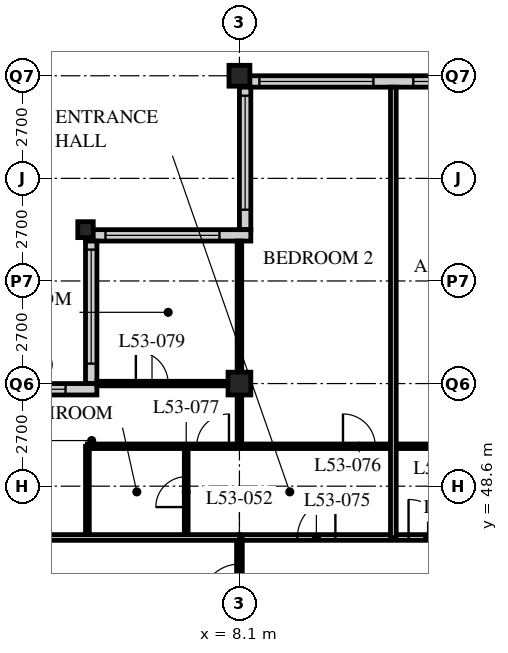
"""IFC4 building model, lengths in metres.
Left out: names, types, materials, properties, quantities, classifications, styles, units other than length and angle.
Written with IfcOpenShell. Run it as: python <this file> out.ifc"""

import sys

from ifc_helpers import new_model, si_unit, direction, frame, frame_2d, origin, origin_2d, place, context, subcontext, project, spatial, rectangle, hollow_rectangle, i_section, extrude, element, fill, save


model = new_model("IFC4")
c1 = context("Model", 3, precision=1e-05, world=origin(), true_north=direction((0.0, 1.0)))
c2 = subcontext(c1, "Body", "Model", "MODEL_VIEW")
j1 = project(units=[si_unit("LENGTHUNIT", "METRE"), si_unit("PLANEANGLEUNIT", "RADIAN")], contexts=[c1])
p1 = place(None, origin())
s1 = spatial("IfcSite", under=j1, at=p1, CompositionType="ELEMENT")
p2 = place(p1, origin())
s2 = spatial("IfcBuilding", under=s1, at=p2, CompositionType="ELEMENT")
p3 = place(p2, frame((0.0, 0.0, 206.4)))
s3 = spatial("IfcBuildingStorey", under=s2, at=p3, CompositionType="ELEMENT", Elevation=206.4)
p4 = place(p3, frame((4.05, 55.35, 0.0), z_axis=(0.0, 0.0, 1.0), x_axis=(1.0, 0.0, 0.0)))
e1 = element("IfcColumn", 1, at=p4, inside=s3, PredefinedType="COLUMN", context=c2, shape_type="SweptSolid", body=[
    extrude(i_section(OverallWidth=0.407, OverallDepth=0.419, WebThickness=0.031, FlangeThickness=0.049, FilletRadius=0.015, at=origin_2d()), origin(), (0.0, 0.0, 1.0), 3.6),
])
p5 = place(p3, frame((8.1, 51.3, 0.0), z_axis=(0.0, 0.0, 1.0), x_axis=(1.0, 0.0, 0.0)))
e2 = element("IfcColumn", 2, at=p5, inside=s3, PredefinedType="COLUMN", context=c2, shape_type="SweptSolid", body=[
    extrude(hollow_rectangle(XDim=0.6, YDim=0.6, WallThickness=0.05, at=origin_2d()), origin(), (0.0, 0.0, 1.0), 3.6),
])
p6 = place(p3, frame((8.1, 59.4, 0.0), z_axis=(0.0, 0.0, 1.0), x_axis=(1.0, 0.0, 0.0)))
e3 = element("IfcColumn", 3, at=p6, inside=s3, PredefinedType="COLUMN", context=c2, shape_type="SweptSolid", body=[
    extrude(hollow_rectangle(XDim=0.55, YDim=0.55, WallThickness=0.045, at=origin_2d()), origin(), (0.0, 0.0, 1.0), 3.6),
])
p7 = place(p3, frame((48.3, 59.25, 0.0), z_axis=(0.0, 0.0, 1.0), x_axis=(-1.0, 0.0, 0.0)))
e4 = element("IfcWall", 4, at=p7, inside=s3, PredefinedType="SOLIDWALL", context=c2, shape_type="SweptSolid", body=[
    extrude(rectangle(XDim=40.2, YDim=0.3, at=frame_2d((20.1, 0.0))), origin(), (0.0, 0.0, 1.0), 3.39),
])
p8 = place(p7, frame((0.225, 0.0, 0.6)))
e5 = element("IfcOpeningElement", 5, at=p8, cuts=e4, PredefinedType="OPENING", context=c2, shape_type="SweptSolid", body=[
    extrude(rectangle(XDim=3.0, YDim=2.4, at=frame_2d((1.5, 1.2))), frame((0.0, 0.16, 0.0), z_axis=(0.0, -1.0, 0.0), x_axis=(1.0, 0.0, 0.0)), (0.0, 0.0, 1.0), 0.32),
])
p9 = place(p7, frame((4.275, 0.0, 0.6)))
e6 = element("IfcOpeningElement", 6, at=p9, cuts=e4, PredefinedType="OPENING", context=c2, shape_type="SweptSolid", body=[
    extrude(rectangle(XDim=3.0, YDim=2.4, at=frame_2d((1.5, 1.2))), frame((0.0, 0.16, 0.0), z_axis=(0.0, -1.0, 0.0), x_axis=(1.0, 0.0, 0.0)), (0.0, 0.0, 1.0), 0.32),
])
p10 = place(p7, frame((8.325, 0.0, 0.6)))
e7 = element("IfcOpeningElement", 7, at=p10, cuts=e4, PredefinedType="OPENING", context=c2, shape_type="SweptSolid", body=[
    extrude(rectangle(XDim=3.0, YDim=2.4, at=frame_2d((1.5, 1.2))), frame((0.0, 0.16, 0.0), z_axis=(0.0, -1.0, 0.0), x_axis=(1.0, 0.0, 0.0)), (0.0, 0.0, 1.0), 0.32),
])
p11 = place(p7, frame((12.375, 0.0, 0.6)))
e8 = element("IfcOpeningElement", 8, at=p11, cuts=e4, PredefinedType="OPENING", context=c2, shape_type="SweptSolid", body=[
    extrude(rectangle(XDim=3.0, YDim=2.4, at=frame_2d((1.5, 1.2))), frame((0.0, 0.16, 0.0), z_axis=(0.0, -1.0, 0.0), x_axis=(1.0, 0.0, 0.0)), (0.0, 0.0, 1.0), 0.32),
])
p12 = place(p7, frame((16.425, 0.0, 0.6)))
e9 = element("IfcOpeningElement", 9, at=p12, cuts=e4, PredefinedType="OPENING", context=c2, shape_type="SweptSolid", body=[
    extrude(rectangle(XDim=3.0, YDim=2.4, at=frame_2d((1.5, 1.2))), frame((0.0, 0.16, 0.0), z_axis=(0.0, -1.0, 0.0), x_axis=(1.0, 0.0, 0.0)), (0.0, 0.0, 1.0), 0.32),
])
p13 = place(p7, frame((20.475, 0.0, 0.6)))
e10 = element("IfcOpeningElement", 10, at=p13, cuts=e4, PredefinedType="OPENING", context=c2, shape_type="SweptSolid", body=[
    extrude(rectangle(XDim=3.0, YDim=2.4, at=frame_2d((1.5, 1.2))), frame((0.0, 0.16, 0.0), z_axis=(0.0, -1.0, 0.0), x_axis=(1.0, 0.0, 0.0)), (0.0, 0.0, 1.0), 0.32),
])
p14 = place(p7, frame((24.525, 0.0, 0.6)))
e11 = element("IfcOpeningElement", 11, at=p14, cuts=e4, PredefinedType="OPENING", context=c2, shape_type="SweptSolid", body=[
    extrude(rectangle(XDim=3.0, YDim=2.4, at=frame_2d((1.5, 1.2))), frame((0.0, 0.16, 0.0), z_axis=(0.0, -1.0, 0.0), x_axis=(1.0, 0.0, 0.0)), (0.0, 0.0, 1.0), 0.32),
])
p15 = place(p7, frame((28.575, 0.0, 0.6)))
e12 = element("IfcOpeningElement", 12, at=p15, cuts=e4, PredefinedType="OPENING", context=c2, shape_type="SweptSolid", body=[
    extrude(rectangle(XDim=3.0, YDim=2.4, at=frame_2d((1.5, 1.2))), frame((0.0, 0.16, 0.0), z_axis=(0.0, -1.0, 0.0), x_axis=(1.0, 0.0, 0.0)), (0.0, 0.0, 1.0), 0.32),
])
p16 = place(p7, frame((32.625, 0.0, 0.6)))
e13 = element("IfcOpeningElement", 13, at=p16, cuts=e4, PredefinedType="OPENING", context=c2, shape_type="SweptSolid", body=[
    extrude(rectangle(XDim=3.0, YDim=2.4, at=frame_2d((1.5, 1.2))), frame((0.0, 0.16, 0.0), z_axis=(0.0, -1.0, 0.0), x_axis=(1.0, 0.0, 0.0)), (0.0, 0.0, 1.0), 0.32),
])
p17 = place(p7, frame((36.675, 0.0, 0.6)))
e14 = element("IfcOpeningElement", 14, at=p17, cuts=e4, PredefinedType="OPENING", context=c2, shape_type="SweptSolid", body=[
    extrude(rectangle(XDim=3.0, YDim=2.4, at=frame_2d((1.5, 1.2))), frame((0.0, 0.16, 0.0), z_axis=(0.0, -1.0, 0.0), x_axis=(1.0, 0.0, 0.0)), (0.0, 0.0, 1.0), 0.32),
])
p18 = place(p3, frame((8.25, 59.1, 0.0), z_axis=(0.0, 0.0, 1.0), x_axis=(0.0, -1.0, 0.0)))
e15 = element("IfcWall", 15, at=p18, inside=s3, PredefinedType="SOLIDWALL", context=c2, shape_type="SweptSolid", body=[
    extrude(rectangle(XDim=3.75, YDim=0.3, at=frame_2d((1.875, 0.0))), origin(), (0.0, 0.0, 1.0), 3.39),
])
p19 = place(p18, frame((0.225, 0.0, 0.6)))
e16 = element("IfcOpeningElement", 16, at=p19, cuts=e15, PredefinedType="OPENING", context=c2, shape_type="SweptSolid", body=[
    extrude(rectangle(XDim=3.0, YDim=2.0, at=frame_2d((1.5, 1.0))), frame((0.0, 0.16, 0.0), z_axis=(0.0, -1.0, 0.0), x_axis=(1.0, 0.0, 0.0)), (0.0, 0.0, 1.0), 0.32),
])
p20 = place(p3, frame((8.4, 55.2, 0.0), z_axis=(0.0, 0.0, 1.0), x_axis=(-1.0, 0.0, 0.0)))
e17 = element("IfcWall", 17, at=p20, inside=s3, PredefinedType="SOLIDWALL", context=c2, shape_type="SweptSolid", body=[
    extrude(rectangle(XDim=4.35, YDim=0.3, at=frame_2d((2.175, 0.0))), origin(), (0.0, 0.0, 1.0), 3.39),
])
p21 = place(p20, frame((0.825, 0.0, 0.6)))
e18 = element("IfcOpeningElement", 18, at=p21, cuts=e17, PredefinedType="OPENING", context=c2, shape_type="SweptSolid", body=[
    extrude(rectangle(XDim=3.0, YDim=2.0, at=frame_2d((1.5, 1.0))), frame((0.0, 0.16, 0.0), z_axis=(0.0, -1.0, 0.0), x_axis=(1.0, 0.0, 0.0)), (0.0, 0.0, 1.0), 0.32),
])
p22 = place(p3, frame((4.2, 55.05, 0.0), z_axis=(0.0, 0.0, 1.0), x_axis=(0.0, -1.0, 0.0)))
e19 = element("IfcWall", 19, at=p22, inside=s3, PredefinedType="SOLIDWALL", context=c2, shape_type="SweptSolid", body=[
    extrude(rectangle(XDim=3.75, YDim=0.3, at=frame_2d((1.875, 0.0))), origin(), (0.0, 0.0, 1.0), 3.39),
])
p23 = place(p22, frame((0.225, 0.0, 0.6)))
e20 = element("IfcOpeningElement", 20, at=p23, cuts=e19, PredefinedType="OPENING", context=c2, shape_type="SweptSolid", body=[
    extrude(rectangle(XDim=3.0, YDim=2.0, at=frame_2d((1.5, 1.0))), frame((0.0, 0.16, 0.0), z_axis=(0.0, -1.0, 0.0), x_axis=(1.0, 0.0, 0.0)), (0.0, 0.0, 1.0), 0.32),
])
p24 = place(p3, frame((4.35, 51.15, 0.0), z_axis=(0.0, 0.0, 1.0), x_axis=(-1.0, 0.0, 0.0)))
e21 = element("IfcWall", 21, at=p24, inside=s3, PredefinedType="SOLIDWALL", context=c2, shape_type="SweptSolid", body=[
    extrude(rectangle(XDim=4.35, YDim=0.3, at=frame_2d((2.175, 0.0))), origin(), (0.0, 0.0, 1.0), 3.39),
])
p25 = place(p24, frame((0.825, 0.0, 0.6)))
e22 = element("IfcOpeningElement", 22, at=p25, cuts=e21, PredefinedType="OPENING", context=c2, shape_type="SweptSolid", body=[
    extrude(rectangle(XDim=3.0, YDim=2.0, at=frame_2d((1.5, 1.0))), frame((0.0, 0.16, 0.0), z_axis=(0.0, -1.0, 0.0), x_axis=(1.0, 0.0, 0.0)), (0.0, 0.0, 1.0), 0.32),
])
p26 = place(p3, frame((8.1, 47.25, 0.0), z_axis=(0.0, 0.0, 1.0), x_axis=(1.0, 0.0, 0.0)))
e23 = element("IfcWall", 23, at=p26, inside=s3, PredefinedType="PARTITIONING", context=c2, shape_type="SweptSolid", body=[
    extrude(rectangle(XDim=36.45, YDim=0.15, at=frame_2d((18.225, 0.0))), origin(), (0.0, 0.0, 1.0), 3.39),
])
p27 = place(p26, frame((4.45, 0.0, 0.0)))
e24 = element("IfcOpeningElement", 24, at=p27, cuts=e23, PredefinedType="OPENING", context=c2, shape_type="SweptSolid", body=[
    extrude(rectangle(XDim=1.0, YDim=2.1, at=frame_2d((0.5, 1.05))), frame((0.0, 0.085, 0.0), z_axis=(0.0, -1.0, 0.0), x_axis=(1.0, 0.0, 0.0)), (0.0, 0.0, 1.0), 0.17),
])
p28 = place(p26, frame((12.55, 0.0, 0.0)))
e25 = element("IfcOpeningElement", 25, at=p28, cuts=e23, PredefinedType="OPENING", context=c2, shape_type="SweptSolid", body=[
    extrude(rectangle(XDim=1.0, YDim=2.1, at=frame_2d((0.5, 1.05))), frame((0.0, 0.085, 0.0), z_axis=(0.0, -1.0, 0.0), x_axis=(1.0, 0.0, 0.0)), (0.0, 0.0, 1.0), 0.17),
])
p29 = place(p26, frame((30.7, 0.0, 0.0)))
e26 = element("IfcOpeningElement", 26, at=p29, cuts=e23, PredefinedType="OPENING", context=c2, shape_type="SweptSolid", body=[
    extrude(rectangle(XDim=1.0, YDim=2.1, at=frame_2d((0.5, 1.05))), frame((0.0, 0.085, 0.0), z_axis=(0.0, -1.0, 0.0), x_axis=(1.0, 0.0, 0.0)), (0.0, 0.0, 1.0), 0.17),
])
p30 = place(p26, frame((33.925, 0.0, 0.0)))
e27 = element("IfcOpeningElement", 27, at=p30, cuts=e23, PredefinedType="OPENING", context=c2, shape_type="SweptSolid", body=[
    extrude(rectangle(XDim=1.0, YDim=2.1, at=frame_2d((0.5, 1.05))), frame((0.0, 0.085, 0.0), z_axis=(0.0, -1.0, 0.0), x_axis=(1.0, 0.0, 0.0)), (0.0, 0.0, 1.0), 0.17),
])
p31 = place(p26, frame((1.525, 0.0, 0.0)))
e28 = element("IfcOpeningElement", 28, at=p31, cuts=e23, PredefinedType="OPENING", context=c2, shape_type="SweptSolid", body=[
    extrude(rectangle(XDim=1.0, YDim=2.1, at=frame_2d((0.5, 1.05))), frame((0.0, 0.085, 0.0), z_axis=(0.0, -1.0, 0.0), x_axis=(1.0, 0.0, 0.0)), (0.0, 0.0, 1.0), 0.17),
])
p32 = place(p3, frame((8.1, 18.9, 0.0), z_axis=(0.0, 0.0, 1.0), x_axis=(0.0, 1.0, 0.0)))
e29 = element("IfcWall", 29, at=p32, inside=s3, PredefinedType="PARTITIONING", context=c2, shape_type="SweptSolid", body=[
    extrude(rectangle(XDim=28.35, YDim=0.15, at=frame_2d((14.175, 0.0))), origin(), (0.0, 0.0, 1.0), 2.778),
])
p33 = place(p32, frame((0.9, 0.0, 0.0)))
e30 = element("IfcOpeningElement", 30, at=p33, cuts=e29, PredefinedType="OPENING", context=c2, shape_type="SweptSolid", body=[
    extrude(rectangle(XDim=1.0, YDim=2.1, at=frame_2d((0.5, 1.05))), frame((0.0, 0.085, 0.0), z_axis=(0.0, -1.0, 0.0), x_axis=(1.0, 0.0, 0.0)), (0.0, 0.0, 1.0), 0.17),
])
p34 = place(p32, frame((17.1, 0.0, 0.0)))
e31 = element("IfcOpeningElement", 31, at=p34, cuts=e29, PredefinedType="OPENING", context=c2, shape_type="SweptSolid", body=[
    extrude(rectangle(XDim=1.0, YDim=2.1, at=frame_2d((0.5, 1.05))), frame((0.0, 0.085, 0.0), z_axis=(0.0, -1.0, 0.0), x_axis=(1.0, 0.0, 0.0)), (0.0, 0.0, 1.0), 0.17),
])
p35 = place(p32, frame((26.65, 0.0, 0.0)))
e32 = element("IfcOpeningElement", 32, at=p35, cuts=e29, PredefinedType="OPENING", context=c2, shape_type="SweptSolid", body=[
    extrude(rectangle(XDim=1.0, YDim=2.1, at=frame_2d((0.5, 1.05))), frame((0.0, 0.085, 0.0), z_axis=(0.0, -1.0, 0.0), x_axis=(1.0, 0.0, 0.0)), (0.0, 0.0, 1.0), 0.17),
])
p36 = place(p3, frame((6.7, 47.25, 0.0), z_axis=(0.0, 0.0, 1.0), x_axis=(0.0, 1.0, 0.0)))
e33 = element("IfcWall", 33, at=p36, inside=s3, PredefinedType="PARTITIONING", context=c2, shape_type="SweptSolid", body=[
    extrude(rectangle(XDim=2.4, YDim=0.1, at=frame_2d((1.2, 0.0))), origin(), (0.0, 0.0, 1.0), 3.39),
])
p37 = place(p36, frame((0.8, 0.0, 0.0)))
e34 = element("IfcOpeningElement", 34, at=p37, cuts=e33, PredefinedType="OPENING", context=c2, shape_type="SweptSolid", body=[
    extrude(rectangle(XDim=0.8, YDim=2.1, at=frame_2d((0.4, 1.05))), frame((0.0, 0.06, 0.0), z_axis=(0.0, -1.0, 0.0), x_axis=(1.0, 0.0, 0.0)), (0.0, 0.0, 1.0), 0.12),
])
p38 = place(p3, frame((4.1, 47.25, 0.0), z_axis=(0.0, 0.0, 1.0), x_axis=(0.0, 1.0, 0.0)))
e35 = element("IfcWall", 35, at=p38, inside=s3, PredefinedType="PARTITIONING", context=c2, shape_type="SweptSolid", body=[
    extrude(rectangle(XDim=2.4, YDim=0.1, at=frame_2d((1.2, 0.0))), origin(), (0.0, 0.0, 1.0), 3.39),
])
p39 = place(p3, frame((4.1, 49.65, 0.0), z_axis=(0.0, 0.0, 1.0), x_axis=(1.0, 0.0, 0.0)))
e36 = element("IfcWall", 36, at=p39, inside=s3, PredefinedType="PARTITIONING", context=c2, shape_type="SweptSolid", body=[
    extrude(rectangle(XDim=32.35, YDim=0.12, at=frame_2d((16.175, 0.0))), origin(), (0.0, 0.0, 1.0), 3.39),
])
p40 = place(p39, frame((9.025, 0.0, 0.0)))
e37 = element("IfcOpeningElement", 37, at=p40, cuts=e36, PredefinedType="OPENING", context=c2, shape_type="SweptSolid", body=[
    extrude(rectangle(XDim=0.85, YDim=2.1, at=frame_2d((0.425, 1.05))), frame((0.0, 0.07, 0.0), z_axis=(0.0, -1.0, 0.0), x_axis=(1.0, 0.0, 0.0)), (0.0, 0.0, 1.0), 0.14),
])
p41 = place(p39, frame((12.425, 0.0, 0.0)))
e38 = element("IfcOpeningElement", 38, at=p41, cuts=e36, PredefinedType="OPENING", context=c2, shape_type="SweptSolid", body=[
    extrude(rectangle(XDim=0.85, YDim=2.1, at=frame_2d((0.425, 1.05))), frame((0.0, 0.07, 0.0), z_axis=(0.0, -1.0, 0.0), x_axis=(1.0, 0.0, 0.0)), (0.0, 0.0, 1.0), 0.14),
])
p42 = place(p39, frame((17.125, 0.0, 0.0)))
e39 = element("IfcOpeningElement", 39, at=p42, cuts=e36, PredefinedType="OPENING", context=c2, shape_type="SweptSolid", body=[
    extrude(rectangle(XDim=0.85, YDim=2.1, at=frame_2d((0.425, 1.05))), frame((0.0, 0.07, 0.0), z_axis=(0.0, -1.0, 0.0), x_axis=(1.0, 0.0, 0.0)), (0.0, 0.0, 1.0), 0.14),
])
p43 = place(p39, frame((24.575, 0.0, 0.0)))
e40 = element("IfcOpeningElement", 40, at=p43, cuts=e36, PredefinedType="OPENING", context=c2, shape_type="SweptSolid", body=[
    extrude(rectangle(XDim=0.85, YDim=2.1, at=frame_2d((0.425, 1.05))), frame((0.0, 0.07, 0.0), z_axis=(0.0, -1.0, 0.0), x_axis=(1.0, 0.0, 0.0)), (0.0, 0.0, 1.0), 0.14),
])
p44 = place(p39, frame((28.625, 0.0, 0.0)))
e41 = element("IfcOpeningElement", 41, at=p44, cuts=e36, PredefinedType="OPENING", context=c2, shape_type="SweptSolid", body=[
    extrude(rectangle(XDim=0.85, YDim=2.1, at=frame_2d((0.425, 1.05))), frame((0.0, 0.07, 0.0), z_axis=(0.0, -1.0, 0.0), x_axis=(1.0, 0.0, 0.0)), (0.0, 0.0, 1.0), 0.14),
])
p45 = place(p39, frame((6.725, 0.0, 0.0)))
e42 = element("IfcOpeningElement", 42, at=p45, cuts=e36, PredefinedType="OPENING", context=c2, shape_type="SweptSolid", body=[
    extrude(rectangle(XDim=0.85, YDim=2.1, at=frame_2d((0.425, 1.05))), frame((0.0, 0.07, 0.0), z_axis=(0.0, -1.0, 0.0), x_axis=(1.0, 0.0, 0.0)), (0.0, 0.0, 1.0), 0.14),
])
p46 = place(p39, frame((2.875, 0.0, 0.0)))
e43 = element("IfcOpeningElement", 43, at=p46, cuts=e36, PredefinedType="OPENING", context=c2, shape_type="SweptSolid", body=[
    extrude(rectangle(XDim=0.85, YDim=2.1, at=frame_2d((0.425, 1.05))), frame((0.0, 0.07, 0.0), z_axis=(0.0, -1.0, 0.0), x_axis=(1.0, 0.0, 0.0)), (0.0, 0.0, 1.0), 0.14),
])
p47 = place(p3, frame((8.1, 49.65, 0.0), z_axis=(0.0, 0.0, 1.0), x_axis=(0.0, 1.0, 0.0)))
e44 = element("IfcWall", 44, at=p47, inside=s3, PredefinedType="PARTITIONING", context=c2, shape_type="SweptSolid", body=[
    extrude(rectangle(XDim=5.4, YDim=0.12, at=frame_2d((2.7, 0.0))), origin(), (0.0, 0.0, 1.0), 2.778),
])
p48 = place(p3, frame((8.1, 51.3, 0.0), z_axis=(0.0, 0.0, 1.0), x_axis=(-1.0, 0.0, 0.0)))
e45 = element("IfcWall", 45, at=p48, inside=s3, PredefinedType="PARTITIONING", context=c2, shape_type="SweptSolid", body=[
    extrude(rectangle(XDim=3.75, YDim=0.12, at=frame_2d((1.875, 0.0))), origin(), (0.0, 0.0, 1.0), 2.778),
])
p49 = place(p48, frame((1.875, 0.0, 0.0)))
e46 = element("IfcOpeningElement", 46, at=p49, cuts=e45, PredefinedType="OPENING", context=c2, shape_type="SweptSolid", body=[
    extrude(rectangle(XDim=0.85, YDim=2.1, at=frame_2d((0.425, 1.05))), frame((0.0, 0.07, 0.0), z_axis=(0.0, -1.0, 0.0), x_axis=(1.0, 0.0, 0.0)), (0.0, 0.0, 1.0), 0.14),
])
p50 = place(p3, frame((0.3, 47.25, 0.0), z_axis=(0.0, 0.0, 1.0), x_axis=(1.0, 0.0, 0.0)))
e47 = element("IfcWall", 47, at=p50, inside=s3, PredefinedType="PARTITIONING", context=c2, shape_type="SweptSolid", body=[
    extrude(rectangle(XDim=7.8, YDim=0.15, at=frame_2d((3.9, 0.0))), origin(), (0.0, 0.0, 1.0), 3.39),
])
p51 = place(p3, frame((12.15, 47.25, 0.0), z_axis=(0.0, 0.0, 1.0), x_axis=(0.0, 1.0, 0.0)))
e48 = element("IfcWall", 48, at=p51, inside=s3, PredefinedType="PARTITIONING", context=c2, shape_type="SweptSolid", body=[
    extrude(rectangle(XDim=11.85, YDim=0.15, at=frame_2d((5.925, 0.0))), origin(), (0.0, 0.0, 1.0), 3.39),
])
p52 = place(p16, origin())
e49 = element("IfcWindow", 49, at=p52, inside=s3, PartitioningType="SINGLE_PANEL", PredefinedType="WINDOW", context=c2, shape_type="SweptSolid", body=[
    extrude(rectangle(XDim=3.0, YDim=2.4, at=frame_2d((1.5, 1.2))), frame((0.0, 0.03, 0.0), z_axis=(0.0, -1.0, 0.0), x_axis=(1.0, 0.0, 0.0)), (0.0, 0.0, 1.0), 0.06),
])
fill(e13, e49)
p53 = place(p17, origin())
e50 = element("IfcWindow", 50, at=p53, inside=s3, PartitioningType="SINGLE_PANEL", PredefinedType="WINDOW", context=c2, shape_type="SweptSolid", body=[
    extrude(rectangle(XDim=3.0, YDim=2.4, at=frame_2d((1.5, 1.2))), frame((0.0, 0.03, 0.0), z_axis=(0.0, -1.0, 0.0), x_axis=(1.0, 0.0, 0.0)), (0.0, 0.0, 1.0), 0.06),
])
fill(e14, e50)
p54 = place(p19, origin())
e51 = element("IfcWindow", 51, at=p54, inside=s3, PartitioningType="SINGLE_PANEL", PredefinedType="WINDOW", context=c2, shape_type="SweptSolid", body=[
    extrude(rectangle(XDim=3.0, YDim=2.0, at=frame_2d((1.5, 1.0))), frame((0.0, 0.03, 0.0), z_axis=(0.0, -1.0, 0.0), x_axis=(1.0, 0.0, 0.0)), (0.0, 0.0, 1.0), 0.06),
])
fill(e16, e51)
p55 = place(p21, origin())
e52 = element("IfcWindow", 52, at=p55, inside=s3, PartitioningType="SINGLE_PANEL", PredefinedType="WINDOW", context=c2, shape_type="SweptSolid", body=[
    extrude(rectangle(XDim=3.0, YDim=2.0, at=frame_2d((1.5, 1.0))), frame((0.0, 0.03, 0.0), z_axis=(0.0, -1.0, 0.0), x_axis=(1.0, 0.0, 0.0)), (0.0, 0.0, 1.0), 0.06),
])
fill(e18, e52)
p56 = place(p23, origin())
e53 = element("IfcWindow", 53, at=p56, inside=s3, PartitioningType="SINGLE_PANEL", PredefinedType="WINDOW", context=c2, shape_type="SweptSolid", body=[
    extrude(rectangle(XDim=3.0, YDim=2.0, at=frame_2d((1.5, 1.0))), frame((0.0, 0.03, 0.0), z_axis=(0.0, -1.0, 0.0), x_axis=(1.0, 0.0, 0.0)), (0.0, 0.0, 1.0), 0.06),
])
fill(e20, e53)
p57 = place(p25, origin())
e54 = element("IfcWindow", 54, at=p57, inside=s3, PartitioningType="SINGLE_PANEL", PredefinedType="WINDOW", context=c2, shape_type="SweptSolid", body=[
    extrude(rectangle(XDim=3.0, YDim=2.0, at=frame_2d((1.5, 1.0))), frame((0.0, 0.03, 0.0), z_axis=(0.0, -1.0, 0.0), x_axis=(1.0, 0.0, 0.0)), (0.0, 0.0, 1.0), 0.06),
])
fill(e22, e54)
p58 = place(p27, origin())
e55 = element("IfcDoor", 55, at=p58, inside=s3, OperationType="SINGLE_SWING_LEFT", PredefinedType="DOOR", context=c2, shape_type="SweptSolid", body=[
    extrude(rectangle(XDim=1.0, YDim=2.1, at=frame_2d((0.5, 1.05))), frame((0.0, 0.025, 0.0), z_axis=(0.0, -1.0, 0.0), x_axis=(1.0, 0.0, 0.0)), (0.0, 0.0, 1.0), 0.05),
])
fill(e24, e55)
p59 = place(p35, origin())
e56 = element("IfcDoor", 56, at=p59, inside=s3, OperationType="SINGLE_SWING_LEFT", PredefinedType="DOOR", context=c2, shape_type="SweptSolid", body=[
    extrude(rectangle(XDim=1.0, YDim=2.1, at=frame_2d((0.5, 1.05))), frame((0.0, 0.025, 0.0), z_axis=(0.0, -1.0, 0.0), x_axis=(1.0, 0.0, 0.0)), (0.0, 0.0, 1.0), 0.05),
])
fill(e32, e56)
p60 = place(p31, origin())
e57 = element("IfcDoor", 57, at=p60, inside=s3, OperationType="SINGLE_SWING_RIGHT", PredefinedType="DOOR", context=c2, shape_type="SweptSolid", body=[
    extrude(rectangle(XDim=1.0, YDim=2.1, at=frame_2d((0.5, 1.05))), frame((0.0, 0.025, 0.0), z_axis=(0.0, -1.0, 0.0), x_axis=(1.0, 0.0, 0.0)), (0.0, 0.0, 1.0), 0.05),
])
fill(e28, e57)
p61 = place(p45, origin())
e58 = element("IfcDoor", 58, at=p61, inside=s3, OperationType="SINGLE_SWING_LEFT", PredefinedType="DOOR", context=c2, shape_type="SweptSolid", body=[
    extrude(rectangle(XDim=0.85, YDim=2.1, at=frame_2d((0.425, 1.05))), frame((0.0, 0.025, 0.0), z_axis=(0.0, -1.0, 0.0), x_axis=(1.0, 0.0, 0.0)), (0.0, 0.0, 1.0), 0.05),
])
fill(e42, e58)
p62 = place(p37, origin())
e59 = element("IfcDoor", 59, at=p62, inside=s3, OperationType="SINGLE_SWING_LEFT", PredefinedType="DOOR", context=c2, shape_type="SweptSolid", body=[
    extrude(rectangle(XDim=0.8, YDim=2.1, at=frame_2d((0.4, 1.05))), frame((0.0, 0.025, 0.0), z_axis=(0.0, -1.0, 0.0), x_axis=(1.0, 0.0, 0.0)), (0.0, 0.0, 1.0), 0.05),
])
fill(e34, e59)
p63 = place(p46, origin())
e60 = element("IfcDoor", 60, at=p63, inside=s3, OperationType="SINGLE_SWING_RIGHT", PredefinedType="DOOR", context=c2, shape_type="SweptSolid", body=[
    extrude(rectangle(XDim=0.85, YDim=2.1, at=frame_2d((0.425, 1.05))), frame((0.0, 0.025, 0.0), z_axis=(0.0, -1.0, 0.0), x_axis=(1.0, 0.0, 0.0)), (0.0, 0.0, 1.0), 0.05),
])
fill(e43, e60)
p64 = place(p49, origin())
e61 = element("IfcDoor", 61, at=p64, inside=s3, OperationType="SINGLE_SWING_LEFT", PredefinedType="DOOR", context=c2, shape_type="SweptSolid", body=[
    extrude(rectangle(XDim=0.85, YDim=2.1, at=frame_2d((0.425, 1.05))), frame((0.0, 0.025, 0.0), z_axis=(0.0, -1.0, 0.0), x_axis=(1.0, 0.0, 0.0)), (0.0, 0.0, 1.0), 0.05),
])
fill(e46, e61)
save(model, sys.argv[1])
